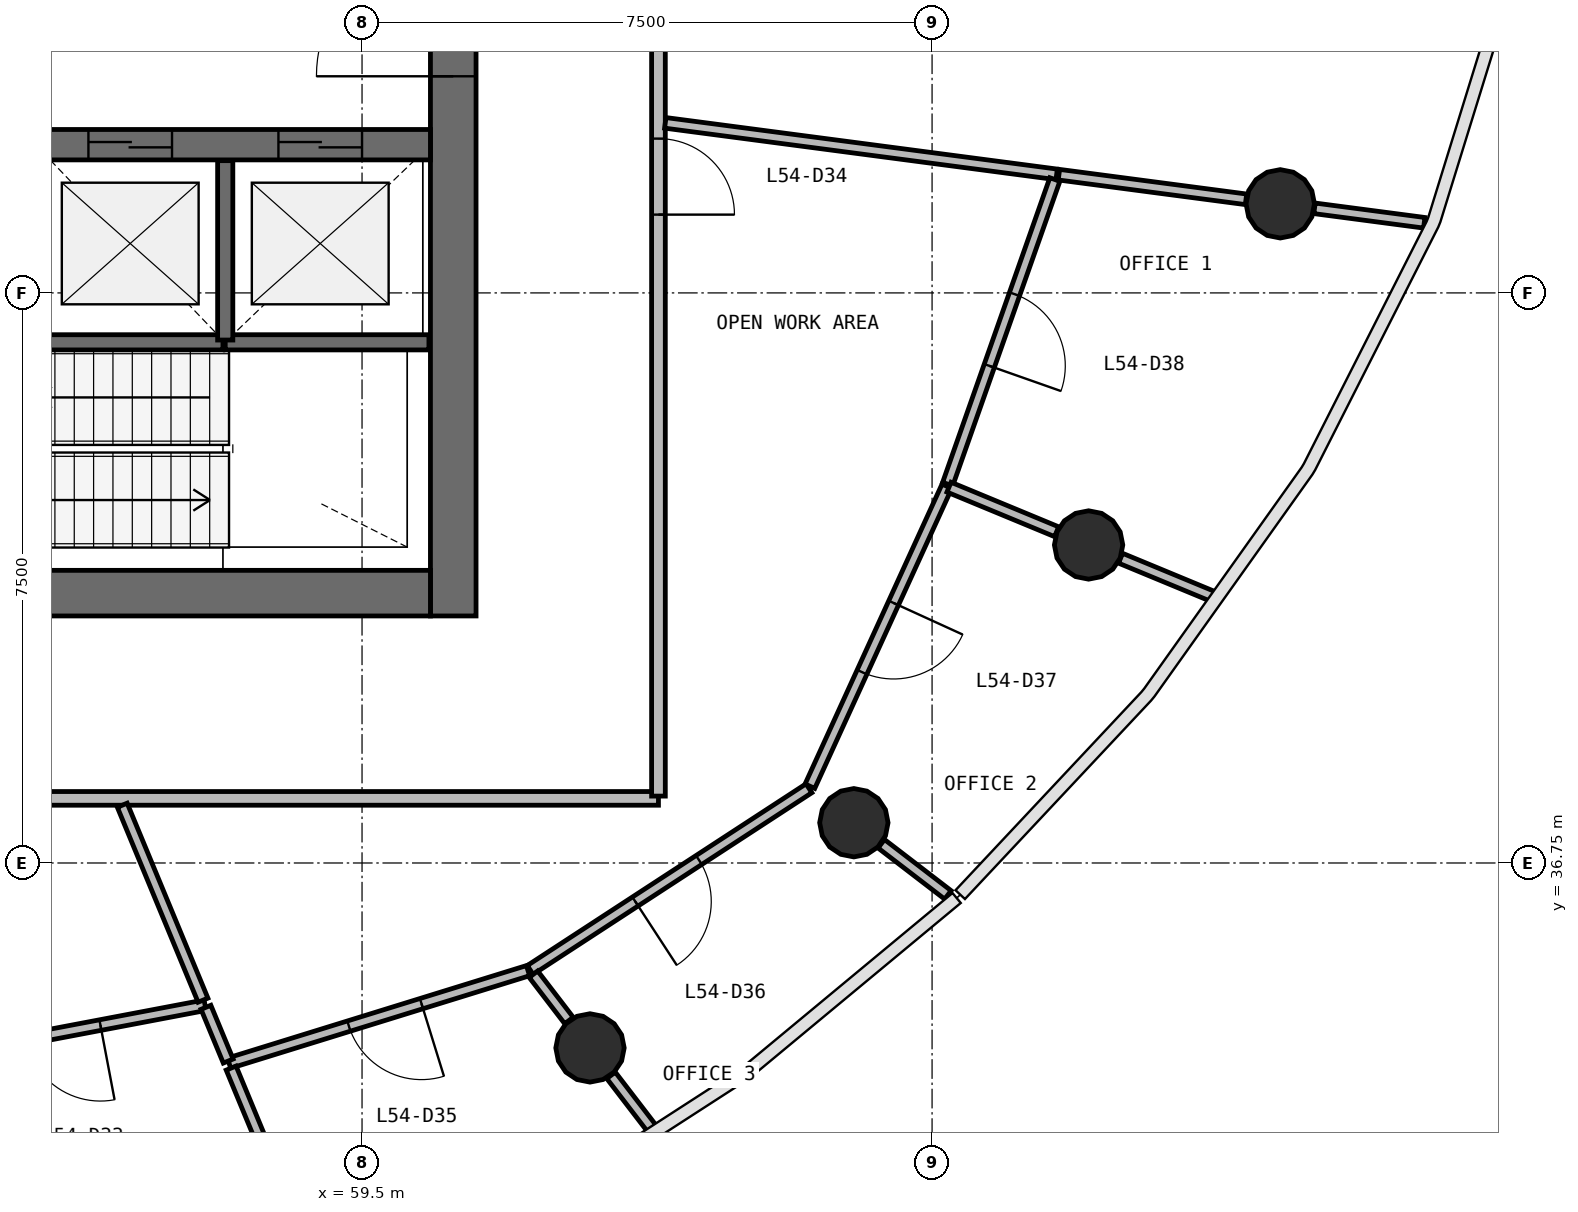
"""IFC4 building model, lengths in metres.
Left out: names, types, materials, properties, quantities, classifications, styles, units other than length and angle.
Written with IfcOpenShell. Run it as: python <this file> out.ifc"""

import sys

from ifc_helpers import new_model, si_unit, direction, frame, frame_2d, origin, origin_2d, place, context, subcontext, project, spatial, rectangle, circle, extrude, source, transform, mapped, element, fill, save


model = new_model("IFC4")
c1 = context("Model", 3, precision=1e-05, world=origin(), true_north=direction((0.0, 1.0)))
c2 = subcontext(c1, "Body", "Model", "MODEL_VIEW")
j1 = project(units=[si_unit("LENGTHUNIT", "METRE"), si_unit("PLANEANGLEUNIT", "RADIAN")], contexts=[c1])
p1 = place(None, origin())
s1 = spatial("IfcSite", under=j1, at=p1, CompositionType="ELEMENT")
p2 = place(p1, origin())
s2 = spatial("IfcBuilding", under=s1, at=p2, CompositionType="ELEMENT")
p3 = place(p2, frame((0.0, 0.0, 222.8)))
s3 = spatial("IfcBuildingStorey", under=s2, at=p3, CompositionType="ELEMENT", Elevation=222.8)
p4 = place(p3, frame((60.7, 40.0, 0.0), z_axis=(0.0, 0.0, 1.0), x_axis=(0.0, 1.0, 0.0)))
e1 = element("IfcWall", 1, at=p4, inside=s3, PredefinedType="SHEAR", context=c2, shape_type="SweptSolid", body=[
    extrude(rectangle(XDim=16.0, YDim=0.6, at=frame_2d((8.0, 0.0))), origin(), (0.0, 0.0, 1.0), 3.9),
])
p5 = place(p4, frame((7.1, 0.0, 0.0)))
e2 = element("IfcOpeningElement", 2, at=p5, cuts=e1, PredefinedType="OPENING", context=c2, shape_type="SweptSolid", body=[
    extrude(rectangle(XDim=1.8, YDim=2.1, at=frame_2d((0.9, 1.05))), frame((0.0, 0.31, 0.0), z_axis=(0.0, -1.0, 0.0), x_axis=(1.0, 0.0, 0.0)), (0.0, 0.0, 1.0), 0.62),
])
p6 = place(p3, frame((43.6, 40.3, 0.0), z_axis=(0.0, 0.0, 1.0), x_axis=(1.0, 0.0, 0.0)))
e3 = element("IfcWall", 3, at=p6, inside=s3, PredefinedType="SHEAR", context=c2, shape_type="SweptSolid", body=[
    extrude(rectangle(XDim=16.8, YDim=0.6, at=frame_2d((8.4, 0.0))), origin(), (0.0, 0.0, 1.0), 3.9),
])
p7 = place(p6, frame((10.3, 0.0, 0.0)))
e4 = element("IfcOpeningElement", 4, at=p7, cuts=e3, PredefinedType="OPENING", context=c2, shape_type="SweptSolid", body=[
    extrude(rectangle(XDim=1.2, YDim=2.1, at=frame_2d((0.6, 1.05))), frame((0.0, 0.31, 0.0), z_axis=(0.0, -1.0, 0.0), x_axis=(1.0, 0.0, 0.0)), (0.0, 0.0, 1.0), 0.62),
])
p8 = place(p6, frame((7.25, 0.0, 0.0)))
e5 = element("IfcOpeningElement", 5, at=p8, cuts=e3, PredefinedType="OPENING", context=c2, shape_type="SweptSolid", body=[
    extrude(rectangle(XDim=1.1, YDim=2.1, at=frame_2d((0.55, 1.05))), frame((0.0, 0.31, 0.0), z_axis=(0.0, -1.0, 0.0), x_axis=(1.0, 0.0, 0.0)), (0.0, 0.0, 1.0), 0.62),
])
p9 = place(p6, frame((0.7, 0.0, 0.0)))
e6 = element("IfcOpeningElement", 6, at=p9, cuts=e3, PredefinedType="OPENING", context=c2, shape_type="SweptSolid", body=[
    extrude(rectangle(XDim=0.8, YDim=2.1, at=frame_2d((0.4, 1.05))), frame((0.0, 0.31, 0.0), z_axis=(0.0, -1.0, 0.0), x_axis=(1.0, 0.0, 0.0)), (0.0, 0.0, 1.0), 0.62),
])
p10 = place(p3, frame((43.6, 46.2, 0.0), z_axis=(0.0, 0.0, 1.0), x_axis=(1.0, 0.0, 0.0)))
e7 = element("IfcWall", 7, at=p10, inside=s3, PredefinedType="SHEAR", context=c2, shape_type="SweptSolid", body=[
    extrude(rectangle(XDim=16.8, YDim=0.4, at=frame_2d((8.4, 0.0))), origin(), (0.0, 0.0, 1.0), 3.9),
])
p11 = place(p10, frame((9.8, 0.0, 0.0)))
e8 = element("IfcOpeningElement", 8, at=p11, cuts=e7, PredefinedType="OPENING", context=c2, shape_type="SweptSolid", body=[
    extrude(rectangle(XDim=1.1, YDim=2.1, at=frame_2d((0.55, 1.05))), frame((0.0, 0.21, 0.0), z_axis=(0.0, -1.0, 0.0), x_axis=(1.0, 0.0, 0.0)), (0.0, 0.0, 1.0), 0.42),
])
p12 = place(p10, frame((12.3, 0.0, 0.0)))
e9 = element("IfcOpeningElement", 9, at=p12, cuts=e7, PredefinedType="OPENING", context=c2, shape_type="SweptSolid", body=[
    extrude(rectangle(XDim=1.1, YDim=2.1, at=frame_2d((0.55, 1.05))), frame((0.0, 0.21, 0.0), z_axis=(0.0, -1.0, 0.0), x_axis=(1.0, 0.0, 0.0)), (0.0, 0.0, 1.0), 0.42),
])
p13 = place(p10, frame((14.8, 0.0, 0.0)))
e10 = element("IfcOpeningElement", 10, at=p13, cuts=e7, PredefinedType="OPENING", context=c2, shape_type="SweptSolid", body=[
    extrude(rectangle(XDim=1.1, YDim=2.1, at=frame_2d((0.55, 1.05))), frame((0.0, 0.21, 0.0), z_axis=(0.0, -1.0, 0.0), x_axis=(1.0, 0.0, 0.0)), (0.0, 0.0, 1.0), 0.42),
])
p14 = place(p10, frame((2.45, 0.0, 0.0)))
e11 = element("IfcOpeningElement", 11, at=p14, cuts=e7, PredefinedType="OPENING", context=c2, shape_type="SweptSolid", body=[
    extrude(rectangle(XDim=0.9, YDim=2.1, at=frame_2d((0.45, 1.05))), frame((0.0, 0.21, 0.0), z_axis=(0.0, -1.0, 0.0), x_axis=(1.0, 0.0, 0.0)), (0.0, 0.0, 1.0), 0.42),
])
p15 = place(p10, frame((7.85, 0.0, 0.0)))
e12 = element("IfcOpeningElement", 12, at=p15, cuts=e7, PredefinedType="OPENING", context=c2, shape_type="SweptSolid", body=[
    extrude(rectangle(XDim=0.9, YDim=2.1, at=frame_2d((0.45, 1.05))), frame((0.0, 0.21, 0.0), z_axis=(0.0, -1.0, 0.0), x_axis=(1.0, 0.0, 0.0)), (0.0, 0.0, 1.0), 0.42),
])
m1 = source(origin(), c2, "Body", "SweptSolid", [
    extrude(circle(Radius=0.45, at=origin_2d()), origin(), (0.0, 0.0, 1.0), 3.9),
])
for number, where, z_axis, x_axis in (
    (13, (62.499, 34.317, 0.0), (0.0, 0.0, 1.0), (1.0, 0.0, 0.0)),
    (14, (65.971, 37.28, 0.0), (0.0, 0.0, 1.0), (1.0, 0.0, 0.0)),
    (15, (69.059, 40.934, 0.0), (0.0, 0.0, 1.0), (1.0, 0.0, 0.0)),
    (16, (71.581, 45.422, 0.0), (0.0, 0.0, 1.0), (1.0, 0.0, 0.0)),
):
    element("IfcColumn", number, at=place(p3, frame(where, z_axis=z_axis, x_axis=x_axis)), inside=s3, PredefinedType="COLUMN", context=c2, shape_type="MappedRepresentation", body=[
        mapped(m1, transform((0.0, 0.0, 0.0), scale=1.0)),
    ])
p16 = place(p3, frame((57.7, 43.6, 0.0), z_axis=(0.0, 0.0, 1.0), x_axis=(1.0, 0.0, 0.0)))
e17 = element("IfcWall", 17, at=p16, inside=s3, PredefinedType="SOLIDWALL", context=c2, shape_type="SweptSolid", body=[
    extrude(rectangle(XDim=2.68, YDim=0.2, at=frame_2d((1.34, 0.0))), origin(), (0.0, 0.0, 1.0), 3.58),
])
p17 = place(p3, frame((55.2, 43.6, 0.0), z_axis=(0.0, 0.0, 1.0), x_axis=(1.0, 0.0, 0.0)))
e18 = element("IfcWall", 18, at=p17, inside=s3, PredefinedType="SOLIDWALL", context=c2, shape_type="SweptSolid", body=[
    extrude(rectangle(XDim=2.47, YDim=0.2, at=frame_2d((1.235, 0.0))), origin(), (0.0, 0.0, 1.0), 3.58),
])
p18 = place(p3, frame((57.7, 43.63, 0.0), z_axis=(0.0, 0.0, 1.0), x_axis=(0.0, 1.0, 0.0)))
e19 = element("IfcWall", 19, at=p18, inside=s3, PredefinedType="SOLIDWALL", context=c2, shape_type="SweptSolid", body=[
    extrude(rectangle(XDim=2.36, YDim=0.2, at=frame_2d((1.18, 0.0))), origin(), (0.0, 0.0, 1.0), 3.58),
])
p19 = place(p3, frame((63.4, 37.6, 0.0), z_axis=(0.0, 0.0, 1.0), x_axis=(-1.0, 0.0, 0.0)))
e20 = element("IfcWall", 20, at=p19, inside=s3, PredefinedType="PARTITIONING", context=c2, shape_type="SweptSolid", body=[
    extrude(rectangle(XDim=22.8, YDim=0.18, at=frame_2d((11.4, 0.0))), origin(), (0.0, 0.0, 1.0), 2.88),
])
p20 = place(p19, frame((12.95, 0.0, 0.0)))
e21 = element("IfcOpeningElement", 21, at=p20, cuts=e20, PredefinedType="OPENING", context=c2, shape_type="SweptSolid", body=[
    extrude(rectangle(XDim=1.0, YDim=2.1, at=frame_2d((0.5, 1.05))), frame((0.0, 0.1, 0.0), z_axis=(0.0, -1.0, 0.0), x_axis=(1.0, 0.0, 0.0)), (0.0, 0.0, 1.0), 0.2),
])
p21 = place(p19, frame((10.95, 0.0, 0.0)))
e22 = element("IfcOpeningElement", 22, at=p21, cuts=e20, PredefinedType="OPENING", context=c2, shape_type="SweptSolid", body=[
    extrude(rectangle(XDim=1.0, YDim=2.1, at=frame_2d((0.5, 1.05))), frame((0.0, 0.1, 0.0), z_axis=(0.0, -1.0, 0.0), x_axis=(1.0, 0.0, 0.0)), (0.0, 0.0, 1.0), 0.2),
])
p22 = place(p3, frame((63.4, 58.37, 0.0), z_axis=(0.0, 0.0, 1.0), x_axis=(0.0, -1.0, 0.0)))
e23 = element("IfcWall", 23, at=p22, inside=s3, PredefinedType="PARTITIONING", context=c2, shape_type="SweptSolid", body=[
    extrude(rectangle(XDim=20.74, YDim=0.18, at=frame_2d((10.37, 0.0))), origin(), (0.0, 0.0, 1.0), 2.88),
])
p23 = place(p22, frame((12.09, 0.0, 0.0)))
e24 = element("IfcOpeningElement", 24, at=p23, cuts=e23, PredefinedType="OPENING", context=c2, shape_type="SweptSolid", body=[
    extrude(rectangle(XDim=1.0, YDim=2.1, at=frame_2d((0.5, 1.05))), frame((0.0, 0.1, 0.0), z_axis=(0.0, -1.0, 0.0), x_axis=(1.0, 0.0, 0.0)), (0.0, 0.0, 1.0), 0.2),
])
p24 = place(p22, frame((9.89, 0.0, 0.0)))
e25 = element("IfcOpeningElement", 25, at=p24, cuts=e23, PredefinedType="OPENING", context=c2, shape_type="SweptSolid", body=[
    extrude(rectangle(XDim=1.0, YDim=2.1, at=frame_2d((0.5, 1.05))), frame((0.0, 0.1, 0.0), z_axis=(0.0, -1.0, 0.0), x_axis=(1.0, 0.0, 0.0)), (0.0, 0.0, 1.0), 0.2),
])
p25 = place(p3, frame((63.49, 46.487, 0.0), z_axis=(0.0, 0.0, 1.0), x_axis=(0.991443732817, -0.130534764177, 0.0)))
e26 = element("IfcWall", 26, at=p25, inside=s3, PredefinedType="PARTITIONING", context=c2, shape_type="SweptSolid", body=[
    extrude(rectangle(XDim=5.194, YDim=0.14, at=frame_2d((2.597, 0.0))), origin(), (0.0, 0.0, 1.0), 2.88),
])
p26 = place(p3, frame((65.38, 37.733, 0.0), z_axis=(0.0, 0.0, 1.0), x_axis=(-0.83775367787, -0.546048326813, 0.0)))
e27 = element("IfcWall", 27, at=p26, inside=s3, PredefinedType="PARTITIONING", context=c2, shape_type="SweptSolid", body=[
    extrude(rectangle(XDim=4.378, YDim=0.14, at=frame_2d((2.189, 0.0))), origin(), (0.0, 0.0, 1.0), 2.88),
])
p27 = place(p26, frame((1.728, 0.0, 0.0)))
e28 = element("IfcOpeningElement", 28, at=p27, cuts=e27, PredefinedType="OPENING", context=c2, shape_type="SweptSolid", body=[
    extrude(rectangle(XDim=1.0, YDim=2.1, at=frame_2d((0.5, 1.05))), frame((0.0, 0.08, 0.0), z_axis=(0.0, -1.0, 0.0), x_axis=(1.0, 0.0, 0.0)), (0.0, 0.0, 1.0), 0.16),
])
p28 = place(p3, frame((67.195, 41.706, 0.0), z_axis=(0.0, 0.0, 1.0), x_axis=(-0.415511028403, -0.909588140465, 0.0)))
e29 = element("IfcWall", 29, at=p28, inside=s3, PredefinedType="PARTITIONING", context=c2, shape_type="SweptSolid", body=[
    extrude(rectangle(XDim=4.338, YDim=0.14, at=frame_2d((2.169, 0.0))), origin(), (0.0, 0.0, 1.0), 2.88),
])
p29 = place(p28, frame((1.688, 0.0, 0.0)))
e30 = element("IfcOpeningElement", 30, at=p29, cuts=e29, PredefinedType="OPENING", context=c2, shape_type="SweptSolid", body=[
    extrude(rectangle(XDim=1.0, YDim=2.1, at=frame_2d((0.5, 1.05))), frame((0.0, 0.08, 0.0), z_axis=(0.0, -1.0, 0.0), x_axis=(1.0, 0.0, 0.0)), (0.0, 0.0, 1.0), 0.16),
])
p30 = place(p3, frame((68.615, 45.742, 0.0), z_axis=(0.0, 0.0, 1.0), x_axis=(-0.331975337051, -0.94328806607, 0.0)))
e31 = element("IfcWall", 31, at=p30, inside=s3, PredefinedType="PARTITIONING", context=c2, shape_type="SweptSolid", body=[
    extrude(rectangle(XDim=4.249, YDim=0.14, at=frame_2d((2.124, 0.0))), origin(), (0.0, 0.0, 1.0), 2.88),
])
p31 = place(p30, frame((1.599, 0.0, 0.0)))
e32 = element("IfcOpeningElement", 32, at=p31, cuts=e31, PredefinedType="OPENING", context=c2, shape_type="SweptSolid", body=[
    extrude(rectangle(XDim=1.0, YDim=2.1, at=frame_2d((0.5, 1.05))), frame((0.0, 0.08, 0.0), z_axis=(0.0, -1.0, 0.0), x_axis=(1.0, 0.0, 0.0)), (0.0, 0.0, 1.0), 0.16),
])
p32 = place(p3, frame((61.684, 35.333, 0.0), z_axis=(0.0, 0.0, 1.0), x_axis=(-0.955326560437, -0.295552301503, 0.0)))
e33 = element("IfcWall", 33, at=p32, inside=s3, PredefinedType="PARTITIONING", context=c2, shape_type="SweptSolid", body=[
    extrude(rectangle(XDim=4.117, YDim=0.14, at=frame_2d((2.059, 0.0))), origin(), (0.0, 0.0, 1.0), 2.88),
])
p33 = place(p32, frame((1.467, 0.0, 0.0)))
e34 = element("IfcOpeningElement", 34, at=p33, cuts=e33, PredefinedType="OPENING", context=c2, shape_type="SweptSolid", body=[
    extrude(rectangle(XDim=1.0, YDim=2.1, at=frame_2d((0.5, 1.05))), frame((0.0, 0.08, 0.0), z_axis=(0.0, -1.0, 0.0), x_axis=(1.0, 0.0, 0.0)), (0.0, 0.0, 1.0), 0.16),
])
p34 = place(p3, frame((57.435, 34.879, 0.0), z_axis=(0.0, 0.0, 1.0), x_axis=(-0.982461825638, -0.186463833393, 0.0)))
e35 = element("IfcWall", 35, at=p34, inside=s3, PredefinedType="PARTITIONING", context=c2, shape_type="SweptSolid", body=[
    extrude(rectangle(XDim=3.652, YDim=0.14, at=frame_2d((1.826, 0.0))), origin(), (0.0, 0.0, 1.0), 2.88),
])
p35 = place(p34, frame((1.402, 0.0, 0.0)))
e36 = element("IfcOpeningElement", 36, at=p35, cuts=e35, PredefinedType="OPENING", context=c2, shape_type="SweptSolid", body=[
    extrude(rectangle(XDim=1.0, YDim=2.1, at=frame_2d((0.5, 1.05))), frame((0.0, 0.08, 0.0), z_axis=(0.0, -1.0, 0.0), x_axis=(1.0, 0.0, 0.0)), (0.0, 0.0, 1.0), 0.16),
])
p36 = place(p3, frame((56.345, 37.51, 0.0), z_axis=(0.0, 0.0, 1.0), x_axis=(0.382628810216, -0.923902155855, 0.0)))
e37 = element("IfcWall", 37, at=p36, inside=s3, PredefinedType="PARTITIONING", context=c2, shape_type="SweptSolid", body=[
    extrude(rectangle(XDim=2.776, YDim=0.14, at=frame_2d((1.388, 0.0))), origin(), (0.0, 0.0, 1.0), 2.88),
])
p37 = place(p3, frame((68.669, 45.805, 0.0), z_axis=(0.0, 0.0, 1.0), x_axis=(0.991448939308, -0.130495213495, 0.0)))
e38 = element("IfcWall", 38, at=p37, inside=s3, PredefinedType="PARTITIONING", context=c2, shape_type="SweptSolid", body=[
    extrude(rectangle(XDim=2.483, YDim=0.14, at=frame_2d((1.241, 0.0))), origin(), (0.0, 0.0, 1.0), 2.88),
])
p38 = place(p3, frame((57.778, 34.052, 0.0), z_axis=(0.0, 0.0, 1.0), x_axis=(0.382636491463, -0.923898974672, 0.0)))
e39 = element("IfcWall", 39, at=p38, inside=s3, PredefinedType="PARTITIONING", context=c2, shape_type="SweptSolid", body=[
    extrude(rectangle(XDim=1.691, YDim=0.14, at=frame_2d((0.846, 0.0))), origin(), (0.0, 0.0, 1.0), 2.88),
])
p39 = place(p3, frame((67.223, 41.695, 0.0), z_axis=(0.0, 0.0, 1.0), x_axis=(0.923847917348, -0.382759749205, 0.0)))
e40 = element("IfcWall", 40, at=p39, inside=s3, PredefinedType="PARTITIONING", context=c2, shape_type="SweptSolid", body=[
    extrude(rectangle(XDim=1.533, YDim=0.14, at=frame_2d((0.766, 0.0))), origin(), (0.0, 0.0, 1.0), 2.88),
])
p40 = place(p3, frame((72.031, 45.363, 0.0), z_axis=(0.0, 0.0, 1.0), x_axis=(0.991438884998, -0.130571579275, 0.0)))
e41 = element("IfcWall", 41, at=p40, inside=s3, PredefinedType="PARTITIONING", context=c2, shape_type="SweptSolid", body=[
    extrude(rectangle(XDim=1.457, YDim=0.14, at=frame_2d((0.728, 0.0))), origin(), (0.0, 0.0, 1.0), 2.88),
])
p41 = place(p3, frame((69.48, 40.76, 0.0), z_axis=(0.0, 0.0, 1.0), x_axis=(0.923901775897, -0.382629727666, 0.0)))
e42 = element("IfcWall", 42, at=p41, inside=s3, PredefinedType="PARTITIONING", context=c2, shape_type="SweptSolid", body=[
    extrude(rectangle(XDim=1.319, YDim=0.14, at=frame_2d((0.659, 0.0))), origin(), (0.0, 0.0, 1.0), 2.88),
])
p42 = place(p3, frame((66.332, 37.003, 0.0), z_axis=(0.0, 0.0, 1.0), x_axis=(0.793403619358, -0.608695898449, 0.0)))
e43 = element("IfcWall", 43, at=p42, inside=s3, PredefinedType="PARTITIONING", context=c2, shape_type="SweptSolid", body=[
    extrude(rectangle(XDim=1.105, YDim=0.14, at=frame_2d((0.552, 0.0))), origin(), (0.0, 0.0, 1.0), 2.88),
])
p43 = place(p3, frame((62.776, 33.956, 0.0), z_axis=(0.0, 0.0, 1.0), x_axis=(0.608973072877, -0.793190895378, 0.0)))
e44 = element("IfcWall", 44, at=p43, inside=s3, PredefinedType="PARTITIONING", context=c2, shape_type="SweptSolid", body=[
    extrude(rectangle(XDim=0.88, YDim=0.14, at=frame_2d((0.44, 0.0))), origin(), (0.0, 0.0, 1.0), 2.88),
])
p44 = place(p3, frame((61.755, 35.287, 0.0), z_axis=(0.0, 0.0, 1.0), x_axis=(0.608665182247, -0.793427183754, 0.0)))
e45 = element("IfcWall", 45, at=p44, inside=s3, PredefinedType="PARTITIONING", context=c2, shape_type="SweptSolid", body=[
    extrude(rectangle(XDim=0.768, YDim=0.14, at=frame_2d((0.384, 0.0))), origin(), (0.0, 0.0, 1.0), 2.88),
])
p45 = place(p3, frame((57.446, 34.851, 0.0), z_axis=(0.0, 0.0, 1.0), x_axis=(0.382802560388, -0.92383017907, 0.0)))
e46 = element("IfcWall", 46, at=p45, inside=s3, PredefinedType="PARTITIONING", context=c2, shape_type="SweptSolid", body=[
    extrude(rectangle(XDim=0.765, YDim=0.14, at=frame_2d((0.383, 0.0))), origin(), (0.0, 0.0, 1.0), 2.88),
])
m2 = source(origin(), c2, "Body", "SweptSolid", [
    extrude(rectangle(XDim=1.8, YDim=2.1, at=frame_2d((0.9, 1.05))), frame((0.0, 0.025, 0.0), z_axis=(0.0, -1.0, 0.0), x_axis=(1.0, 0.0, 0.0)), (0.0, 0.0, 1.0), 0.05),
])
p46 = place(p5, origin())
e47 = element("IfcDoor", 47, at=p46, inside=s3, OperationType="SINGLE_SWING_LEFT", PredefinedType="DOOR", context=c2, shape_type="MappedRepresentation", body=[
    mapped(m2, transform((0.0, 0.0, 0.0), scale=1.0)),
])
fill(e2, e47)
m3 = source(origin(), c2, "Body", "SweptSolid", [
    extrude(rectangle(XDim=1.1, YDim=2.1, at=frame_2d((0.55, 1.05))), frame((0.0, 0.025, 0.0), z_axis=(0.0, -1.0, 0.0), x_axis=(1.0, 0.0, 0.0)), (0.0, 0.0, 1.0), 0.05),
])
p47 = place(p12, origin())
e48 = element("IfcDoor", 48, at=p47, inside=s3, OperationType="DOUBLE_DOOR_SLIDING", PredefinedType="USERDEFINED", context=c2, shape_type="MappedRepresentation", body=[
    mapped(m3, transform((0.0, 0.0, 0.0), scale=1.0)),
])
fill(e9, e48)
p48 = place(p13, origin())
e49 = element("IfcDoor", 49, at=p48, inside=s3, OperationType="DOUBLE_DOOR_SLIDING", PredefinedType="USERDEFINED", context=c2, shape_type="MappedRepresentation", body=[
    mapped(m3, transform((0.0, 0.0, 0.0), scale=1.0)),
])
fill(e10, e49)
m4 = source(origin(), c2, "Body", "SweptSolid", [
    extrude(rectangle(XDim=1.0, YDim=2.1, at=frame_2d((0.5, 1.05))), frame((0.0, 0.025, 0.0), z_axis=(0.0, -1.0, 0.0), x_axis=(1.0, 0.0, 0.0)), (0.0, 0.0, 1.0), 0.05),
])
p49 = place(p35, origin())
e50 = element("IfcDoor", 50, at=p49, inside=s3, OperationType="SINGLE_SWING_LEFT", PredefinedType="DOOR", context=c2, shape_type="MappedRepresentation", body=[
    mapped(m4, transform((0.0, 0.0, 0.0), scale=1.0)),
])
fill(e36, e50)
p50 = place(p23, origin())
e51 = element("IfcDoor", 51, at=p50, inside=s3, OperationType="SINGLE_SWING_RIGHT", PredefinedType="DOOR", context=c2, shape_type="MappedRepresentation", body=[
    mapped(m4, transform((0.0, 0.0, 0.0), scale=1.0)),
])
fill(e24, e51)
p51 = place(p33, origin())
e52 = element("IfcDoor", 52, at=p51, inside=s3, OperationType="SINGLE_SWING_LEFT", PredefinedType="DOOR", context=c2, shape_type="MappedRepresentation", body=[
    mapped(m4, transform((0.0, 0.0, 0.0), scale=1.0)),
])
fill(e34, e52)
p52 = place(p27, origin())
e53 = element("IfcDoor", 53, at=p52, inside=s3, OperationType="SINGLE_SWING_RIGHT", PredefinedType="DOOR", context=c2, shape_type="MappedRepresentation", body=[
    mapped(m4, transform((0.0, 0.0, 0.0), scale=1.0)),
])
fill(e28, e53)
p53 = place(p29, origin())
e54 = element("IfcDoor", 54, at=p53, inside=s3, OperationType="SINGLE_SWING_LEFT", PredefinedType="DOOR", context=c2, shape_type="MappedRepresentation", body=[
    mapped(m4, transform((0.0, 0.0, 0.0), scale=1.0)),
])
fill(e30, e54)
p54 = place(p31, origin())
e55 = element("IfcDoor", 55, at=p54, inside=s3, OperationType="SINGLE_SWING_RIGHT", PredefinedType="DOOR", context=c2, shape_type="MappedRepresentation", body=[
    mapped(m4, transform((0.0, 0.0, 0.0), scale=1.0)),
])
fill(e32, e55)
save(model, sys.argv[1])
